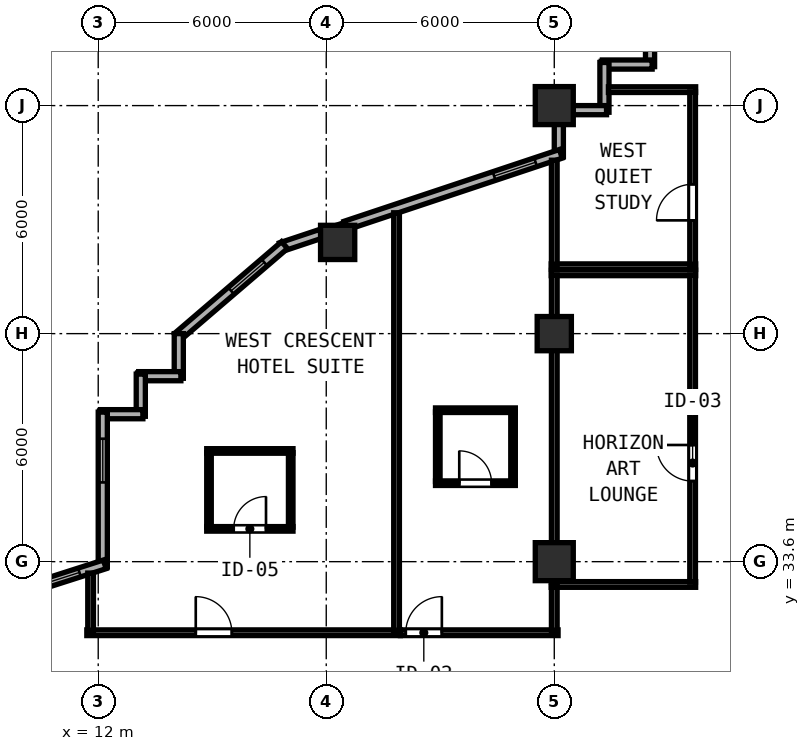
"""IFC4 building model, lengths in metres.
Left out: names, types, materials, properties, quantities, classifications, styles, units other than length and angle.
Written with IfcOpenShell. Run it as: python <this file> out.ifc"""

import sys

from ifc_helpers import new_model, si_unit, direction, frame, frame_2d, origin, origin_2d, place, context, subcontext, project, spatial, rectangle, hollow_rectangle, extrude, element, fill, save


model = new_model("IFC4")
c1 = context("Model", 3, precision=1e-05, world=origin(), true_north=direction((0.0, 1.0)))
c2 = subcontext(c1, "Body", "Model", "MODEL_VIEW")
j1 = project(units=[si_unit("LENGTHUNIT", "METRE"), si_unit("PLANEANGLEUNIT", "RADIAN")], contexts=[c1])
p1 = place(None, origin())
s1 = spatial("IfcSite", under=j1, at=p1, CompositionType="ELEMENT")
p2 = place(p1, origin())
s2 = spatial("IfcBuilding", under=s1, at=p2, CompositionType="ELEMENT")
p3 = place(p2, frame((0.0, 0.0, 113.6)))
s3 = spatial("IfcBuildingStorey", under=s2, at=p3, CompositionType="ELEMENT", Elevation=113.6)
for number, where, z_axis, x_axis in (
    (1, (24.0, 33.6, 0.0), (0.0, 0.0, 1.0), (1.0, 0.0, 0.0)),
    (2, (24.0, 45.6, 0.0), (0.0, 0.0, 1.0), (1.0, 0.0, 0.0)),
):
    element("IfcColumn", number, at=place(p3, frame(where, z_axis=z_axis, x_axis=x_axis)), inside=s3, PredefinedType="COLUMN", context=c2, shape_type="SweptSolid", body=[
        extrude(hollow_rectangle(XDim=1.0, YDim=1.0, WallThickness=0.038, at=origin_2d()), origin(), (0.0, 0.0, 1.0), 3.8),
    ])
for number, where, z_axis, x_axis in (
    (3, (24.0, 39.6, 0.0), (0.0, 0.0, 1.0), (1.0, 0.0, 0.0)),
    (4, (18.3, 42.0, 0.0), (0.0, 0.0, 1.0), (1.0, 0.0, 0.0)),
):
    element("IfcColumn", number, at=place(p3, frame(where, z_axis=z_axis, x_axis=x_axis)), inside=s3, PredefinedType="COLUMN", context=c2, shape_type="SweptSolid", body=[
        extrude(hollow_rectangle(XDim=0.9, YDim=0.9, WallThickness=0.034, at=origin_2d()), origin(), (0.0, 0.0, 1.0), 3.8),
    ])
p4 = place(p3, frame((26.52, 47.995, 0.0), z_axis=(0.0, 0.0, 1.0), x_axis=(0.0, -1.0, 0.0)))
e5 = element("IfcWall", 5, at=p4, inside=s3, PredefinedType="SOLIDWALL", context=c2, shape_type="SweptSolid", body=[
    extrude(rectangle(XDim=1.37, YDim=0.24, at=frame_2d((0.685, 0.0))), origin(), (0.0, 0.0, 1.0), 3.6),
])
for number, where, z_axis, x_axis in (
    (6, (26.575, 46.68, 0.0), (0.0, 0.0, 1.0), (-1.0, 0.0, 0.0)),
    (7, (25.32, 46.735, 0.0), (0.0, 0.0, 1.0), (0.0, -1.0, 0.0)),
):
    element("IfcWall", number, at=place(p3, frame(where, z_axis=z_axis, x_axis=x_axis)), inside=s3, PredefinedType="SOLIDWALL", context=c2, shape_type="SweptSolid", body=[
        extrude(rectangle(XDim=1.31, YDim=0.24, at=frame_2d((0.655, 0.0))), origin(), (0.0, 0.0, 1.0), 3.6),
    ])
p5 = place(p3, frame((25.375, 45.48, 0.0), z_axis=(0.0, 0.0, 1.0), x_axis=(-1.0, 0.0, 0.0)))
e8 = element("IfcWall", 8, at=p5, inside=s3, PredefinedType="SOLIDWALL", context=c2, shape_type="SweptSolid", body=[
    extrude(rectangle(XDim=0.883, YDim=0.24, at=frame_2d((0.441, 0.0))), origin(), (0.0, 0.0, 1.0), 3.6),
])
p6 = place(p3, frame((24.12, 45.108, 0.0), z_axis=(0.0, 0.0, 1.0), x_axis=(0.0, -1.0, 0.0)))
e9 = element("IfcWall", 9, at=p6, inside=s3, PredefinedType="SOLIDWALL", context=c2, shape_type="SweptSolid", body=[
    extrude(rectangle(XDim=0.849, YDim=0.24, at=frame_2d((0.425, 0.0))), origin(), (0.0, 0.0, 1.0), 3.145),
])
p7 = place(p3, frame((24.172, 44.331, 0.0), z_axis=(0.0, 0.0, 1.0), x_axis=(-0.948683298051, -0.316227766017, 0.0)))
e10 = element("IfcWall", 10, at=p7, inside=s3, PredefinedType="SOLIDWALL", context=c2, shape_type="SweptSolid", body=[
    extrude(rectangle(XDim=5.973, YDim=0.24, at=frame_2d((2.987, 0.0))), origin(), (0.0, 0.0, 1.0), 3.145),
])
p8 = place(p7, frame((0.7, 0.0, 0.85)))
e11 = element("IfcOpeningElement", 11, at=p8, cuts=e10, PredefinedType="OPENING", context=c2, shape_type="SweptSolid", body=[
    extrude(rectangle(XDim=1.15, YDim=1.8, at=frame_2d((0.575, 0.9))), frame((0.0, 0.13, 0.0), z_axis=(0.0, -1.0, 0.0), x_axis=(1.0, 0.0, 0.0)), (0.0, 0.0, 1.0), 0.26),
])
p9 = place(p3, frame((17.858, 42.226, 0.0), z_axis=(0.0, 0.0, 1.0), x_axis=(-0.948639166064, -0.316360131194, 0.0)))
e12 = element("IfcWall", 12, at=p9, inside=s3, PredefinedType="SOLIDWALL", context=c2, shape_type="SweptSolid", body=[
    extrude(rectangle(XDim=1.107, YDim=0.24, at=frame_2d((0.553, 0.0))), origin(), (0.0, 0.0, 1.0), 3.6),
])
p10 = place(p3, frame((16.902, 41.929, 0.0), z_axis=(0.0, 0.0, 1.0), x_axis=(-0.759275136126, -0.650769750112, 0.0)))
e13 = element("IfcWall", 13, at=p10, inside=s3, PredefinedType="SOLIDWALL", context=c2, shape_type="SweptSolid", body=[
    extrude(rectangle(XDim=3.719, YDim=0.24, at=frame_2d((1.86, 0.0))), origin(), (0.0, 0.0, 1.0), 3.6),
])
p11 = place(p10, frame((0.7, 0.0, 0.85)))
e14 = element("IfcOpeningElement", 14, at=p11, cuts=e13, PredefinedType="OPENING", context=c2, shape_type="SweptSolid", body=[
    extrude(rectangle(XDim=1.15, YDim=1.8, at=frame_2d((0.575, 0.9))), frame((0.0, 0.13, 0.0), z_axis=(0.0, -1.0, 0.0), x_axis=(1.0, 0.0, 0.0)), (0.0, 0.0, 1.0), 0.26),
])
p12 = place(p3, frame((14.12, 39.6, 0.0), z_axis=(0.0, 0.0, 1.0), x_axis=(0.0, -1.0, 0.0)))
e15 = element("IfcWall", 15, at=p12, inside=s3, PredefinedType="SOLIDWALL", context=c2, shape_type="SweptSolid", body=[
    extrude(rectangle(XDim=1.175, YDim=0.24, at=frame_2d((0.587, 0.0))), origin(), (0.0, 0.0, 1.0), 3.6),
])
p13 = place(p3, frame((14.175, 38.48, 0.0), z_axis=(0.0, 0.0, 1.0), x_axis=(-1.0, 0.0, 0.0)))
e16 = element("IfcWall", 16, at=p13, inside=s3, PredefinedType="SOLIDWALL", context=c2, shape_type="SweptSolid", body=[
    extrude(rectangle(XDim=1.11, YDim=0.24, at=frame_2d((0.555, 0.0))), origin(), (0.0, 0.0, 1.0), 3.6),
])
p14 = place(p3, frame((13.12, 38.535, 0.0), z_axis=(0.0, 0.0, 1.0), x_axis=(0.0, -1.0, 0.0)))
e17 = element("IfcWall", 17, at=p14, inside=s3, PredefinedType="SOLIDWALL", context=c2, shape_type="SweptSolid", body=[
    extrude(rectangle(XDim=1.11, YDim=0.24, at=frame_2d((0.555, 0.0))), origin(), (0.0, 0.0, 1.0), 3.6),
])
p15 = place(p3, frame((13.175, 37.48, 0.0), z_axis=(0.0, 0.0, 1.0), x_axis=(-1.0, 0.0, 0.0)))
e18 = element("IfcWall", 18, at=p15, inside=s3, PredefinedType="SOLIDWALL", context=c2, shape_type="SweptSolid", body=[
    extrude(rectangle(XDim=1.11, YDim=0.24, at=frame_2d((0.555, 0.0))), origin(), (0.0, 0.0, 1.0), 3.6),
])
p16 = place(p3, frame((12.12, 37.535, 0.0), z_axis=(0.0, 0.0, 1.0), x_axis=(0.0, -1.0, 0.0)))
e19 = element("IfcWall", 19, at=p16, inside=s3, PredefinedType="SOLIDWALL", context=c2, shape_type="SweptSolid", body=[
    extrude(rectangle(XDim=4.077, YDim=0.24, at=frame_2d((2.039, 0.0))), origin(), (0.0, 0.0, 1.0), 3.6),
])
p17 = place(p16, frame((0.7, 0.0, 0.85)))
e20 = element("IfcOpeningElement", 20, at=p17, cuts=e19, PredefinedType="OPENING", context=c2, shape_type="SweptSolid", body=[
    extrude(rectangle(XDim=1.15, YDim=1.8, at=frame_2d((0.575, 0.9))), frame((0.0, 0.13, 0.0), z_axis=(0.0, -1.0, 0.0), x_axis=(1.0, 0.0, 0.0)), (0.0, 0.0, 1.0), 0.26),
])
p18 = place(p3, frame((12.172, 33.529, 0.0), z_axis=(0.0, 0.0, 1.0), x_axis=(-0.952419211315, -0.304791151311, 0.0)))
e21 = element("IfcWall", 21, at=p18, inside=s3, PredefinedType="SOLIDWALL", context=c2, shape_type="SweptSolid", body=[
    extrude(rectangle(XDim=8.041, YDim=0.24, at=frame_2d((4.02, 0.0))), origin(), (0.0, 0.0, 1.0), 3.6),
])
p19 = place(p18, frame((0.7, 0.0, 0.85)))
e22 = element("IfcOpeningElement", 22, at=p19, cuts=e21, PredefinedType="OPENING", context=c2, shape_type="SweptSolid", body=[
    extrude(rectangle(XDim=1.15, YDim=1.8, at=frame_2d((0.575, 0.9))), frame((0.0, 0.13, 0.0), z_axis=(0.0, -1.0, 0.0), x_axis=(1.0, 0.0, 0.0)), (0.0, 0.0, 1.0), 0.26),
])
p20 = place(p18, frame((6.1, 0.0, 0.85)))
e23 = element("IfcOpeningElement", 23, at=p20, cuts=e21, PredefinedType="OPENING", context=c2, shape_type="SweptSolid", body=[
    extrude(rectangle(XDim=1.15, YDim=1.8, at=frame_2d((0.575, 0.9))), frame((0.0, 0.13, 0.0), z_axis=(0.0, -1.0, 0.0), x_axis=(1.0, 0.0, 0.0)), (0.0, 0.0, 1.0), 0.26),
])
for number, where, z_axis, x_axis in (
    (24, (23.92, 41.2, 0.0), (0.0, 0.0, 1.0), (1.0, 0.0, 0.0)),
    (25, (23.92, 33.0, 0.0), (0.0, 0.0, 1.0), (1.0, 0.0, 0.0)),
):
    element("IfcWall", number, at=place(p3, frame(where, z_axis=z_axis, x_axis=x_axis)), inside=s3, PredefinedType="PARTITIONING", context=c2, shape_type="SweptSolid", body=[
        extrude(rectangle(XDim=3.8, YDim=0.15, at=frame_2d((1.9, 0.0))), origin(), (0.0, 0.0, 1.0), 3.6),
    ])
p21 = place(p3, frame((24.0, 33.06, 0.0), z_axis=(0.0, 0.0, 1.0), x_axis=(0.0, 1.0, 0.0)))
e26 = element("IfcWall", 26, at=p21, inside=s3, PredefinedType="PARTITIONING", context=c2, shape_type="SweptSolid", body=[
    extrude(rectangle(XDim=8.08, YDim=0.15, at=frame_2d((4.04, 0.0))), origin(), (0.0, 0.0, 1.0), 3.145),
])
p22 = place(p3, frame((27.64, 33.06, 0.0), z_axis=(0.0, 0.0, 1.0), x_axis=(0.0, 1.0, 0.0)))
e27 = element("IfcWall", 27, at=p22, inside=s3, PredefinedType="PARTITIONING", context=c2, shape_type="SweptSolid", body=[
    extrude(rectangle(XDim=8.08, YDim=0.15, at=frame_2d((4.04, 0.0))), origin(), (0.0, 0.0, 1.0), 3.6),
])
p23 = place(p22, frame((3.61, 0.0, 0.0), z_axis=(0.0, 0.0, 1.0), x_axis=(-1.0, 0.0, 0.0)))
e28 = element("IfcOpeningElement", 28, at=p23, cuts=e27, PredefinedType="OPENING", context=c2, shape_type="SweptSolid", body=[
    extrude(rectangle(XDim=0.95, YDim=2.12, at=frame_2d((0.475, 1.06))), frame((0.0, 0.085, 0.0), z_axis=(0.0, -1.0, 0.0), x_axis=(1.0, 0.0, 0.0)), (0.0, 0.0, 1.0), 0.17),
])
p24 = place(p3, frame((25.425, 46.02, 0.0), z_axis=(0.0, 0.0, 1.0), x_axis=(1.0, 0.0, 0.0)))
e29 = element("IfcWall", 29, at=p24, inside=s3, PredefinedType="PARTITIONING", context=c2, shape_type="SweptSolid", body=[
    extrude(rectangle(XDim=2.295, YDim=0.15, at=frame_2d((1.147, 0.0))), origin(), (0.0, 0.0, 1.0), 3.6),
])
p25 = place(p3, frame((23.92, 41.36, 0.0), z_axis=(0.0, 0.0, 1.0), x_axis=(1.0, 0.0, 0.0)))
e30 = element("IfcWall", 30, at=p25, inside=s3, PredefinedType="PARTITIONING", context=c2, shape_type="SweptSolid", body=[
    extrude(rectangle(XDim=3.8, YDim=0.15, at=frame_2d((1.9, 0.0))), origin(), (0.0, 0.0, 1.0), 3.6),
])
p26 = place(p3, frame((24.0, 41.42, 0.0), z_axis=(0.0, 0.0, 1.0), x_axis=(0.0, 1.0, 0.0)))
e31 = element("IfcWall", 31, at=p26, inside=s3, PredefinedType="PARTITIONING", context=c2, shape_type="SweptSolid", body=[
    extrude(rectangle(XDim=2.743, YDim=0.15, at=frame_2d((1.372, 0.0))), origin(), (0.0, 0.0, 1.0), 3.145),
])
p27 = place(p3, frame((27.64, 41.42, 0.0), z_axis=(0.0, 0.0, 1.0), x_axis=(0.0, 1.0, 0.0)))
e32 = element("IfcWall", 32, at=p27, inside=s3, PredefinedType="PARTITIONING", context=c2, shape_type="SweptSolid", body=[
    extrude(rectangle(XDim=4.54, YDim=0.15, at=frame_2d((2.27, 0.0))), origin(), (0.0, 0.0, 1.0), 3.6),
])
p28 = place(p27, frame((2.11, 0.0, 0.0), z_axis=(0.0, 0.0, 1.0), x_axis=(-1.0, 0.0, 0.0)))
e33 = element("IfcOpeningElement", 33, at=p28, cuts=e32, PredefinedType="OPENING", context=c2, shape_type="SweptSolid", body=[
    extrude(rectangle(XDim=0.95, YDim=2.12, at=frame_2d((0.475, 1.06))), frame((0.0, 0.085, 0.0), z_axis=(0.0, -1.0, 0.0), x_axis=(1.0, 0.0, 0.0)), (0.0, 0.0, 1.0), 0.17),
])
p29 = place(p3, frame((11.7, 31.73, 0.0), z_axis=(0.0, 0.0, 1.0), x_axis=(1.0, 0.0, 0.0)))
e34 = element("IfcWall", 34, at=p29, inside=s3, PredefinedType="PARTITIONING", context=c2, shape_type="SweptSolid", body=[
    extrude(rectangle(XDim=8.25, YDim=0.15, at=frame_2d((4.125, 0.0))), origin(), (0.0, 0.0, 1.0), 3.6),
])
p30 = place(p29, frame((2.866, 0.0, 0.0)))
e35 = element("IfcOpeningElement", 35, at=p30, cuts=e34, PredefinedType="OPENING", context=c2, shape_type="SweptSolid", body=[
    extrude(rectangle(XDim=0.95, YDim=2.18, at=frame_2d((0.475, 1.09))), frame((0.0, 0.085, 0.0), z_axis=(0.0, -1.0, 0.0), x_axis=(1.0, 0.0, 0.0)), (0.0, 0.0, 1.0), 0.17),
])
p31 = place(p3, frame((11.8, 31.79, 0.0), z_axis=(0.0, 0.0, 1.0), x_axis=(0.0, 1.0, 0.0)))
e36 = element("IfcWall", 36, at=p31, inside=s3, PredefinedType="PARTITIONING", context=c2, shape_type="SweptSolid", body=[
    extrude(rectangle(XDim=1.51, YDim=0.15, at=frame_2d((0.755, 0.0))), origin(), (0.0, 0.0, 1.0), 3.6),
])
p32 = place(p3, frame((19.85, 31.79, 0.0), z_axis=(0.0, 0.0, 1.0), x_axis=(0.0, 1.0, 0.0)))
e37 = element("IfcWall", 37, at=p32, inside=s3, PredefinedType="PARTITIONING", context=c2, shape_type="SweptSolid", body=[
    extrude(rectangle(XDim=10.99, YDim=0.15, at=frame_2d((5.495, 0.0))), origin(), (0.0, 0.0, 1.0), 3.6),
])
p33 = place(p3, frame((14.855, 36.513, 0.0), z_axis=(0.0, 0.0, 1.0), x_axis=(1.0, 0.0, 0.0)))
e38 = element("IfcWall", 38, at=p33, inside=s3, PredefinedType="PARTITIONING", context=c2, shape_type="SweptSolid", body=[
    extrude(rectangle(XDim=2.27, YDim=0.12, at=frame_2d((1.135, 0.0))), origin(), (0.0, 0.0, 1.0), 3.6),
])
p34 = place(p3, frame((14.855, 34.463, 0.0), z_axis=(0.0, 0.0, 1.0), x_axis=(1.0, 0.0, 0.0)))
e39 = element("IfcWall", 39, at=p34, inside=s3, PredefinedType="PARTITIONING", context=c2, shape_type="SweptSolid", body=[
    extrude(rectangle(XDim=2.27, YDim=0.12, at=frame_2d((1.135, 0.0))), origin(), (0.0, 0.0, 1.0), 3.6),
])
p35 = place(p34, frame((0.71, 0.0, 0.0)))
e40 = element("IfcOpeningElement", 40, at=p35, cuts=e39, PredefinedType="OPENING", context=c2, shape_type="SweptSolid", body=[
    extrude(rectangle(XDim=0.85, YDim=2.1, at=frame_2d((0.425, 1.05))), frame((0.0, 0.07, 0.0), z_axis=(0.0, -1.0, 0.0), x_axis=(1.0, 0.0, 0.0)), (0.0, 0.0, 1.0), 0.14),
])
for number, where, z_axis, x_axis in (
    (41, (14.915, 34.508, 0.0), (0.0, 0.0, 1.0), (0.0, 1.0, 0.0)),
    (42, (17.065, 34.508, 0.0), (0.0, 0.0, 1.0), (0.0, 1.0, 0.0)),
):
    element("IfcWall", number, at=place(p3, frame(where, z_axis=z_axis, x_axis=x_axis)), inside=s3, PredefinedType="PARTITIONING", context=c2, shape_type="SweptSolid", body=[
        extrude(rectangle(XDim=1.96, YDim=0.12, at=frame_2d((0.98, 0.0))), origin(), (0.0, 0.0, 1.0), 3.6),
    ])
p36 = place(p3, frame((19.952, 31.73, 0.0), z_axis=(0.0, 0.0, 1.0), x_axis=(1.0, 0.0, 0.0)))
e43 = element("IfcWall", 43, at=p36, inside=s3, PredefinedType="PARTITIONING", context=c2, shape_type="SweptSolid", body=[
    extrude(rectangle(XDim=4.148, YDim=0.15, at=frame_2d((2.074, 0.0))), origin(), (0.0, 0.0, 1.0), 3.6),
])
p37 = place(p36, frame((0.14, 0.0, 0.0)))
e44 = element("IfcOpeningElement", 44, at=p37, cuts=e43, PredefinedType="OPENING", context=c2, shape_type="SweptSolid", body=[
    extrude(rectangle(XDim=0.95, YDim=2.15, at=frame_2d((0.475, 1.075))), frame((0.0, 0.085, 0.0), z_axis=(0.0, -1.0, 0.0), x_axis=(1.0, 0.0, 0.0)), (0.0, 0.0, 1.0), 0.17),
])
p38 = place(p3, frame((24.0, 31.79, 0.0), z_axis=(0.0, 0.0, 1.0), x_axis=(0.0, 1.0, 0.0)))
e45 = element("IfcWall", 45, at=p38, inside=s3, PredefinedType="PARTITIONING", context=c2, shape_type="SweptSolid", body=[
    extrude(rectangle(XDim=1.15, YDim=0.15, at=frame_2d((0.575, 0.0))), origin(), (0.0, 0.0, 1.0), 3.145),
])
p39 = place(p3, frame((20.875, 37.585, 0.0), z_axis=(0.0, 0.0, 1.0), x_axis=(1.0, 0.0, 0.0)))
e46 = element("IfcWall", 46, at=p39, inside=s3, PredefinedType="PARTITIONING", context=c2, shape_type="SweptSolid", body=[
    extrude(rectangle(XDim=2.1, YDim=0.12, at=frame_2d((1.05, 0.0))), origin(), (0.0, 0.0, 1.0), 3.6),
])
p40 = place(p3, frame((20.875, 35.665, 0.0), z_axis=(0.0, 0.0, 1.0), x_axis=(1.0, 0.0, 0.0)))
e47 = element("IfcWall", 47, at=p40, inside=s3, PredefinedType="PARTITIONING", context=c2, shape_type="SweptSolid", body=[
    extrude(rectangle(XDim=2.1, YDim=0.12, at=frame_2d((1.05, 0.0))), origin(), (0.0, 0.0, 1.0), 3.6),
])
p41 = place(p40, frame((0.625, 0.0, 0.0)))
e48 = element("IfcOpeningElement", 48, at=p41, cuts=e47, PredefinedType="OPENING", context=c2, shape_type="SweptSolid", body=[
    extrude(rectangle(XDim=0.85, YDim=2.1, at=frame_2d((0.425, 1.05))), frame((0.0, 0.07, 0.0), z_axis=(0.0, -1.0, 0.0), x_axis=(1.0, 0.0, 0.0)), (0.0, 0.0, 1.0), 0.14),
])
for number, where, z_axis, x_axis in (
    (49, (20.935, 35.71, 0.0), (0.0, 0.0, 1.0), (0.0, 1.0, 0.0)),
    (50, (22.915, 35.71, 0.0), (0.0, 0.0, 1.0), (0.0, 1.0, 0.0)),
):
    element("IfcWall", number, at=place(p3, frame(where, z_axis=z_axis, x_axis=x_axis)), inside=s3, PredefinedType="PARTITIONING", context=c2, shape_type="SweptSolid", body=[
        extrude(rectangle(XDim=1.83, YDim=0.12, at=frame_2d((0.915, 0.0))), origin(), (0.0, 0.0, 1.0), 3.6),
    ])
p42 = place(p8, origin())
e51 = element("IfcWindow", 51, at=p42, inside=s3, PartitioningType="SINGLE_PANEL", PredefinedType="WINDOW", context=c2, shape_type="SweptSolid", body=[
    extrude(rectangle(XDim=1.15, YDim=1.8, at=frame_2d((0.575, 0.9))), frame((0.0, 0.03, 0.0), z_axis=(0.0, -1.0, 0.0), x_axis=(1.0, 0.0, 0.0)), (0.0, 0.0, 1.0), 0.06),
])
fill(e11, e51)
p43 = place(p11, origin())
e52 = element("IfcWindow", 52, at=p43, inside=s3, PartitioningType="SINGLE_PANEL", PredefinedType="WINDOW", context=c2, shape_type="SweptSolid", body=[
    extrude(rectangle(XDim=1.15, YDim=1.8, at=frame_2d((0.575, 0.9))), frame((0.0, 0.03, 0.0), z_axis=(0.0, -1.0, 0.0), x_axis=(1.0, 0.0, 0.0)), (0.0, 0.0, 1.0), 0.06),
])
fill(e14, e52)
p44 = place(p17, origin())
e53 = element("IfcWindow", 53, at=p44, inside=s3, PartitioningType="SINGLE_PANEL", PredefinedType="WINDOW", context=c2, shape_type="SweptSolid", body=[
    extrude(rectangle(XDim=1.15, YDim=1.8, at=frame_2d((0.575, 0.9))), frame((0.0, 0.03, 0.0), z_axis=(0.0, -1.0, 0.0), x_axis=(1.0, 0.0, 0.0)), (0.0, 0.0, 1.0), 0.06),
])
fill(e20, e53)
p45 = place(p19, origin())
e54 = element("IfcWindow", 54, at=p45, inside=s3, PartitioningType="SINGLE_PANEL", PredefinedType="WINDOW", context=c2, shape_type="SweptSolid", body=[
    extrude(rectangle(XDim=1.15, YDim=1.8, at=frame_2d((0.575, 0.9))), frame((0.0, 0.03, 0.0), z_axis=(0.0, -1.0, 0.0), x_axis=(1.0, 0.0, 0.0)), (0.0, 0.0, 1.0), 0.06),
])
fill(e22, e54)
p46 = place(p23, origin())
e55 = element("IfcDoor", 55, at=p46, inside=s3, OperationType="SINGLE_SWING_LEFT", PredefinedType="DOOR", context=c2, shape_type="SweptSolid", body=[
    extrude(rectangle(XDim=0.95, YDim=2.12, at=frame_2d((0.475, 1.06))), frame((0.0, 0.025, 0.0), z_axis=(0.0, -1.0, 0.0), x_axis=(1.0, 0.0, 0.0)), (0.0, 0.0, 1.0), 0.05),
])
fill(e28, e55)
p47 = place(p28, origin())
e56 = element("IfcDoor", 56, at=p47, inside=s3, OperationType="SINGLE_SWING_RIGHT", PredefinedType="DOOR", context=c2, shape_type="SweptSolid", body=[
    extrude(rectangle(XDim=0.95, YDim=2.12, at=frame_2d((0.475, 1.06))), frame((0.0, 0.025, 0.0), z_axis=(0.0, -1.0, 0.0), x_axis=(1.0, 0.0, 0.0)), (0.0, 0.0, 1.0), 0.05),
])
fill(e33, e56)
p48 = place(p30, origin())
e57 = element("IfcDoor", 57, at=p48, inside=s3, OperationType="SINGLE_SWING_LEFT", PredefinedType="DOOR", context=c2, shape_type="SweptSolid", body=[
    extrude(rectangle(XDim=0.95, YDim=2.18, at=frame_2d((0.475, 1.09))), frame((0.0, 0.025, 0.0), z_axis=(0.0, -1.0, 0.0), x_axis=(1.0, 0.0, 0.0)), (0.0, 0.0, 1.0), 0.05),
])
fill(e35, e57)
p49 = place(p35, origin())
e58 = element("IfcDoor", 58, at=p49, inside=s3, OperationType="SINGLE_SWING_RIGHT", PredefinedType="DOOR", context=c2, shape_type="SweptSolid", body=[
    extrude(rectangle(XDim=0.85, YDim=2.1, at=frame_2d((0.425, 1.05))), frame((0.0, 0.025, 0.0), z_axis=(0.0, -1.0, 0.0), x_axis=(1.0, 0.0, 0.0)), (0.0, 0.0, 1.0), 0.05),
])
fill(e40, e58)
p50 = place(p37, origin())
e59 = element("IfcDoor", 59, at=p50, inside=s3, OperationType="SINGLE_SWING_RIGHT", PredefinedType="DOOR", context=c2, shape_type="SweptSolid", body=[
    extrude(rectangle(XDim=0.95, YDim=2.15, at=frame_2d((0.475, 1.075))), frame((0.0, 0.025, 0.0), z_axis=(0.0, -1.0, 0.0), x_axis=(1.0, 0.0, 0.0)), (0.0, 0.0, 1.0), 0.05),
])
fill(e44, e59)
p51 = place(p41, origin())
e60 = element("IfcDoor", 60, at=p51, inside=s3, OperationType="SINGLE_SWING_LEFT", PredefinedType="DOOR", context=c2, shape_type="SweptSolid", body=[
    extrude(rectangle(XDim=0.85, YDim=2.1, at=frame_2d((0.425, 1.05))), frame((0.0, 0.025, 0.0), z_axis=(0.0, -1.0, 0.0), x_axis=(1.0, 0.0, 0.0)), (0.0, 0.0, 1.0), 0.05),
])
fill(e48, e60)
save(model, sys.argv[1])
